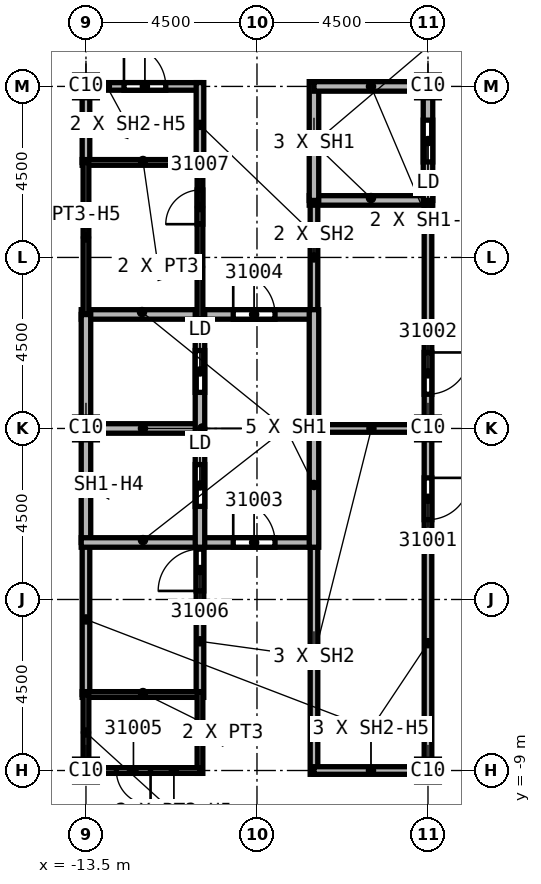
"""IFC4 building model, lengths in metres.
Left out: names, types, materials, properties, quantities, classifications, styles, units other than length and angle.
Written with IfcOpenShell. Run it as: python <this file> out.ifc"""

import sys

from ifc_helpers import new_model, si_unit, direction, frame, frame_2d, origin, origin_2d, place, context, subcontext, project, spatial, rectangle, extrude, element, fill, save


model = new_model("IFC4")
c1 = context("Model", 3, precision=1e-05, world=origin(), true_north=direction((0.0, 1.0)))
c2 = subcontext(c1, "Body", "Model", "MODEL_VIEW")
j1 = project(units=[si_unit("LENGTHUNIT", "METRE"), si_unit("PLANEANGLEUNIT", "RADIAN")], contexts=[c1])
p1 = place(None, origin())
s1 = spatial("IfcSite", under=j1, at=p1, CompositionType="ELEMENT")
p2 = place(p1, origin())
s2 = spatial("IfcBuilding", under=s1, at=p2, CompositionType="ELEMENT")
p3 = place(p2, frame((0.0, 0.0, 350.0)))
s3 = spatial("IfcBuildingStorey", under=s2, at=p3, CompositionType="ELEMENT", Elevation=350.0)
for number, where, z_axis, x_axis in (
    (1, (-4.5, 0.0, 0.0), (0.0, 0.0, 1.0), (1.0, 0.0, 0.0)),
    (2, (-4.5, 9.0, 0.0), (0.0, 0.0, 1.0), (1.0, 0.0, 0.0)),
    (3, (-4.5, -9.0, 0.0), (0.0, 0.0, 1.0), (1.0, 0.0, 0.0)),
    (4, (-13.5, 0.0, 0.0), (0.0, 0.0, 1.0), (1.0, 0.0, 0.0)),
    (5, (-13.5, 9.0, 0.0), (0.0, 0.0, 1.0), (1.0, 0.0, 0.0)),
    (6, (-13.5, -9.0, 0.0), (0.0, 0.0, 1.0), (1.0, 0.0, 0.0)),
):
    element("IfcColumn", number, at=place(p3, frame(where, z_axis=z_axis, x_axis=x_axis)), inside=s3, PredefinedType="COLUMN", context=c2, shape_type="SweptSolid", body=[
        extrude(rectangle(XDim=0.6, YDim=0.6, at=origin_2d()), origin(), (0.0, 0.0, 1.0), 5.6),
    ])
p4 = place(p3, frame((-13.5, -7.0, 0.0), z_axis=(0.0, 0.0, 1.0), x_axis=(0.0, 1.0, 0.0)))
e7 = element("IfcWall", 7, at=p4, inside=s3, PredefinedType="SOLIDWALL", context=c2, shape_type="SweptSolid", body=[
    extrude(rectangle(XDim=4.0, YDim=0.2, at=frame_2d((2.0, 0.0))), origin(), (0.0, 0.0, 1.0), 4.838),
])
p5 = place(p3, frame((-13.5, 7.0, 0.0), z_axis=(0.0, 0.0, 1.0), x_axis=(0.0, 1.0, 0.0)))
e8 = element("IfcWall", 8, at=p5, inside=s3, PredefinedType="SOLIDWALL", context=c2, shape_type="SweptSolid", body=[
    extrude(rectangle(XDim=2.1, YDim=0.2, at=frame_2d((1.05, 0.0))), origin(), (0.0, 0.0, 1.0), 4.838),
])
p6 = place(p3, frame((-13.5, 9.0, 0.0), z_axis=(0.0, 0.0, 1.0), x_axis=(1.0, 0.0, 0.0)))
e9 = element("IfcWall", 9, at=p6, inside=s3, PredefinedType="SOLIDWALL", context=c2, shape_type="SweptSolid", body=[
    extrude(rectangle(XDim=3.0, YDim=0.2, at=frame_2d((1.5, 0.0))), origin(), (0.0, 0.0, 1.0), 4.838),
])
p7 = place(p6, frame((1.0, 0.0, 0.0)))
e10 = element("IfcOpeningElement", 10, at=p7, cuts=e9, PredefinedType="OPENING", context=c2, shape_type="SweptSolid", body=[
    extrude(rectangle(XDim=1.1, YDim=2.1, at=frame_2d((0.55, 1.05))), frame((0.0, 0.1, 0.0), z_axis=(0.0, -1.0, 0.0), x_axis=(1.0, 0.0, 0.0)), (0.0, 0.0, 1.0), 0.2),
])
p8 = place(p3, frame((-10.5, -7.075, 0.0), z_axis=(0.0, 0.0, 1.0), x_axis=(0.0, 1.0, 0.0)))
e11 = element("IfcWall", 11, at=p8, inside=s3, PredefinedType="SOLIDWALL", context=c2, shape_type="SweptSolid", body=[
    extrude(rectangle(XDim=4.2, YDim=0.2, at=frame_2d((2.1, 0.0))), origin(), (0.0, 0.0, 1.0), 5.6),
])
p9 = place(p8, frame((2.8, 0.0, 0.0)))
e12 = element("IfcOpeningElement", 12, at=p9, cuts=e11, PredefinedType="OPENING", context=c2, shape_type="SweptSolid", body=[
    extrude(rectangle(XDim=1.1, YDim=2.1, at=frame_2d((0.55, 1.05))), frame((0.0, 0.1, 0.0), z_axis=(0.0, -1.0, 0.0), x_axis=(1.0, 0.0, 0.0)), (0.0, 0.0, 1.0), 0.2),
])
p10 = place(p3, frame((-10.5, 6.925, 0.0), z_axis=(0.0, 0.0, 1.0), x_axis=(0.0, 1.0, 0.0)))
e13 = element("IfcWall", 13, at=p10, inside=s3, PredefinedType="SOLIDWALL", context=c2, shape_type="SweptSolid", body=[
    extrude(rectangle(XDim=2.175, YDim=0.2, at=frame_2d((1.087, 0.0))), origin(), (0.0, 0.0, 1.0), 5.6),
])
p11 = place(p3, frame((-7.625, 0.0, 0.0), z_axis=(0.0, 0.0, 1.0), x_axis=(1.0, 0.0, 0.0)))
e14 = element("IfcWall", 14, at=p11, inside=s3, PredefinedType="SOLIDWALL", context=c2, shape_type="SweptSolid", body=[
    extrude(rectangle(XDim=3.225, YDim=0.2, at=frame_2d((1.613, 0.0))), origin(), (0.0, 0.0, 1.0), 5.6),
])
p12 = place(p3, frame((-7.5, -9.1, 0.0), z_axis=(0.0, 0.0, 1.0), x_axis=(0.0, 1.0, 0.0)))
e15 = element("IfcWall", 15, at=p12, inside=s3, PredefinedType="SOLIDWALL", context=c2, shape_type="SweptSolid", body=[
    extrude(rectangle(XDim=6.225, YDim=0.2, at=frame_2d((3.113, 0.0))), origin(), (0.0, 0.0, 1.0), 5.6),
])
p13 = place(p3, frame((-7.5, 2.875, 0.0), z_axis=(0.0, 0.0, 1.0), x_axis=(0.0, 1.0, 0.0)))
e16 = element("IfcWall", 16, at=p13, inside=s3, PredefinedType="SOLIDWALL", context=c2, shape_type="SweptSolid", body=[
    extrude(rectangle(XDim=3.125, YDim=0.2, at=frame_2d((1.562, 0.0))), origin(), (0.0, 0.0, 1.0), 5.6),
])
p14 = place(p3, frame((-4.5, -9.0, 0.0), z_axis=(0.0, 0.0, 1.0), x_axis=(-1.0, 0.0, 0.0)))
e17 = element("IfcWall", 17, at=p14, inside=s3, PredefinedType="SOLIDWALL", context=c2, shape_type="SweptSolid", body=[
    extrude(rectangle(XDim=3.0, YDim=0.2, at=frame_2d((1.5, 0.0))), origin(), (0.0, 0.0, 1.0), 4.838),
])
p15 = place(p3, frame((-4.5, 6.0, 0.0), z_axis=(0.0, 0.0, 1.0), x_axis=(0.0, -1.0, 0.0)))
e18 = element("IfcWall", 18, at=p15, inside=s3, PredefinedType="SOLIDWALL", context=c2, shape_type="SweptSolid", body=[
    extrude(rectangle(XDim=15.1, YDim=0.2, at=frame_2d((7.55, 0.0))), origin(), (0.0, 0.0, 1.0), 4.838),
])
p16 = place(p15, frame((7.3, 0.0, 0.0)))
e19 = element("IfcOpeningElement", 19, at=p16, cuts=e18, PredefinedType="OPENING", context=c2, shape_type="SweptSolid", body=[
    extrude(rectangle(XDim=1.1, YDim=2.1, at=frame_2d((0.55, 1.05))), frame((0.0, 0.1, 0.0), z_axis=(0.0, -1.0, 0.0), x_axis=(1.0, 0.0, 0.0)), (0.0, 0.0, 1.0), 0.2),
])
p17 = place(p15, frame((4.0, 0.0, 0.0)))
e20 = element("IfcOpeningElement", 20, at=p17, cuts=e18, PredefinedType="OPENING", context=c2, shape_type="SweptSolid", body=[
    extrude(rectangle(XDim=1.1, YDim=2.1, at=frame_2d((0.55, 1.05))), frame((0.0, 0.1, 0.0), z_axis=(0.0, -1.0, 0.0), x_axis=(1.0, 0.0, 0.0)), (0.0, 0.0, 1.0), 0.2),
])
p18 = place(p3, frame((-13.625, 0.0, 0.0), z_axis=(0.0, 0.0, 1.0), x_axis=(1.0, 0.0, 0.0)))
e21 = element("IfcWall", 21, at=p18, inside=s3, PredefinedType="SOLIDWALL", context=c2, shape_type="SweptSolid", body=[
    extrude(rectangle(XDim=3.125, YDim=0.25, at=frame_2d((1.562, 0.0))), origin(), (0.0, 0.0, 1.0), 5.6),
])
p19 = place(p3, frame((-13.625, 3.0, 0.0), z_axis=(0.0, 0.0, 1.0), x_axis=(1.0, 0.0, 0.0)))
e22 = element("IfcWall", 22, at=p19, inside=s3, PredefinedType="SOLIDWALL", context=c2, shape_type="SweptSolid", body=[
    extrude(rectangle(XDim=6.125, YDim=0.25, at=frame_2d((3.062, 0.0))), origin(), (0.0, 0.0, 1.0), 5.6),
])
p20 = place(p19, frame((4.0, 0.0, 0.0)))
e23 = element("IfcOpeningElement", 23, at=p20, cuts=e22, PredefinedType="OPENING", context=c2, shape_type="SweptSolid", body=[
    extrude(rectangle(XDim=1.1, YDim=2.1, at=frame_2d((0.55, 1.05))), frame((0.0, 0.125, 0.0), z_axis=(0.0, -1.0, 0.0), x_axis=(1.0, 0.0, 0.0)), (0.0, 0.0, 1.0), 0.25),
])
p21 = place(p3, frame((-13.5, -3.0, 0.0), z_axis=(0.0, 0.0, 1.0), x_axis=(0.0, 1.0, 0.0)))
e24 = element("IfcWall", 24, at=p21, inside=s3, PredefinedType="SOLIDWALL", context=c2, shape_type="SweptSolid", body=[
    extrude(rectangle(XDim=6.0, YDim=0.25, at=frame_2d((3.0, 0.0))), origin(), (0.0, 0.0, 1.0), 4.838),
])
p22 = place(p3, frame((-13.625, -3.0, 0.0), z_axis=(0.0, 0.0, 1.0), x_axis=(1.0, 0.0, 0.0)))
e25 = element("IfcWall", 25, at=p22, inside=s3, PredefinedType="SOLIDWALL", context=c2, shape_type="SweptSolid", body=[
    extrude(rectangle(XDim=6.125, YDim=0.25, at=frame_2d((3.062, 0.0))), origin(), (0.0, 0.0, 1.0), 5.6),
])
p23 = place(p22, frame((4.0, 0.0, 0.0)))
e26 = element("IfcOpeningElement", 26, at=p23, cuts=e25, PredefinedType="OPENING", context=c2, shape_type="SweptSolid", body=[
    extrude(rectangle(XDim=1.1, YDim=2.1, at=frame_2d((0.55, 1.05))), frame((0.0, 0.125, 0.0), z_axis=(0.0, -1.0, 0.0), x_axis=(1.0, 0.0, 0.0)), (0.0, 0.0, 1.0), 0.25),
])
p24 = place(p3, frame((-10.5, -3.125, 0.0), z_axis=(0.0, 0.0, 1.0), x_axis=(0.0, 1.0, 0.0)))
e27 = element("IfcWall", 27, at=p24, inside=s3, PredefinedType="SOLIDWALL", context=c2, shape_type="SweptSolid", body=[
    extrude(rectangle(XDim=6.25, YDim=0.25, at=frame_2d((3.125, 0.0))), origin(), (0.0, 0.0, 1.0), 5.6),
])
p25 = place(p24, frame((1.075, 0.0, 0.0)))
e28 = element("IfcOpeningElement", 28, at=p25, cuts=e27, PredefinedType="OPENING", context=c2, shape_type="SweptSolid", body=[
    extrude(rectangle(XDim=1.1, YDim=2.1, at=frame_2d((0.55, 1.05))), frame((0.0, 0.125, 0.0), z_axis=(0.0, -1.0, 0.0), x_axis=(1.0, 0.0, 0.0)), (0.0, 0.0, 1.0), 0.25),
])
p26 = place(p24, frame((4.075, 0.0, 0.0)))
e29 = element("IfcOpeningElement", 29, at=p26, cuts=e27, PredefinedType="OPENING", context=c2, shape_type="SweptSolid", body=[
    extrude(rectangle(XDim=1.1, YDim=2.1, at=frame_2d((0.55, 1.05))), frame((0.0, 0.125, 0.0), z_axis=(0.0, -1.0, 0.0), x_axis=(1.0, 0.0, 0.0)), (0.0, 0.0, 1.0), 0.25),
])
p27 = place(p3, frame((-7.625, 6.0, 0.0), z_axis=(0.0, 0.0, 1.0), x_axis=(1.0, 0.0, 0.0)))
e30 = element("IfcWall", 30, at=p27, inside=s3, PredefinedType="SOLIDWALL", context=c2, shape_type="SweptSolid", body=[
    extrude(rectangle(XDim=3.25, YDim=0.25, at=frame_2d((1.625, 0.0))), origin(), (0.0, 0.0, 1.0), 5.6),
])
p28 = place(p3, frame((-7.5, -3.125, 0.0), z_axis=(0.0, 0.0, 1.0), x_axis=(0.0, 1.0, 0.0)))
e31 = element("IfcWall", 31, at=p28, inside=s3, PredefinedType="SOLIDWALL", context=c2, shape_type="SweptSolid", body=[
    extrude(rectangle(XDim=6.25, YDim=0.25, at=frame_2d((3.125, 0.0))), origin(), (0.0, 0.0, 1.0), 5.6),
])
p29 = place(p3, frame((-7.5, 6.0, 0.0), z_axis=(0.0, 0.0, 1.0), x_axis=(0.0, 1.0, 0.0)))
e32 = element("IfcWall", 32, at=p29, inside=s3, PredefinedType="SOLIDWALL", context=c2, shape_type="SweptSolid", body=[
    extrude(rectangle(XDim=3.125, YDim=0.25, at=frame_2d((1.562, 0.0))), origin(), (0.0, 0.0, 1.0), 5.6),
])
p30 = place(p3, frame((-7.5, 9.0, 0.0), z_axis=(0.0, 0.0, 1.0), x_axis=(1.0, 0.0, 0.0)))
e33 = element("IfcWall", 33, at=p30, inside=s3, PredefinedType="SOLIDWALL", context=c2, shape_type="SweptSolid", body=[
    extrude(rectangle(XDim=3.0, YDim=0.25, at=frame_2d((1.5, 0.0))), origin(), (0.0, 0.0, 1.0), 4.838),
])
p31 = place(p3, frame((-4.5, 9.125, 0.0), z_axis=(0.0, 0.0, 1.0), x_axis=(0.0, -1.0, 0.0)))
e34 = element("IfcWall", 34, at=p31, inside=s3, PredefinedType="SOLIDWALL", context=c2, shape_type="SweptSolid", body=[
    extrude(rectangle(XDim=3.125, YDim=0.25, at=frame_2d((1.562, 0.0))), origin(), (0.0, 0.0, 1.0), 4.838),
])
p32 = place(p31, frame((1.012, 0.0, 0.0)))
e35 = element("IfcOpeningElement", 35, at=p32, cuts=e34, PredefinedType="OPENING", context=c2, shape_type="SweptSolid", body=[
    extrude(rectangle(XDim=1.1, YDim=2.1, at=frame_2d((0.55, 1.05))), frame((0.0, 0.125, 0.0), z_axis=(0.0, -1.0, 0.0), x_axis=(1.0, 0.0, 0.0)), (0.0, 0.0, 1.0), 0.25),
])
for number, where, z_axis, x_axis in (
    (36, (-13.6, -7.0, 0.0), (0.0, 0.0, 1.0), (1.0, 0.0, 0.0)),
    (37, (-13.6, 7.0, 0.0), (0.0, 0.0, 1.0), (1.0, 0.0, 0.0)),
):
    element("IfcWall", number, at=place(p3, frame(where, z_axis=z_axis, x_axis=x_axis)), inside=s3, PredefinedType="PARTITIONING", context=c2, shape_type="SweptSolid", body=[
        extrude(rectangle(XDim=3.1, YDim=0.15, at=frame_2d((1.55, 0.0))), origin(), (0.0, 0.0, 1.0), 5.6),
    ])
p33 = place(p3, frame((-13.5, -9.075, 0.0), z_axis=(0.0, 0.0, 1.0), x_axis=(0.0, 1.0, 0.0)))
e38 = element("IfcWall", 38, at=p33, inside=s3, PredefinedType="PARTITIONING", context=c2, shape_type="SweptSolid", body=[
    extrude(rectangle(XDim=2.075, YDim=0.15, at=frame_2d((1.038, 0.0))), origin(), (0.0, 0.0, 1.0), 4.838),
])
p34 = place(p3, frame((-13.5, 3.0, 0.0), z_axis=(0.0, 0.0, 1.0), x_axis=(0.0, 1.0, 0.0)))
e39 = element("IfcWall", 39, at=p34, inside=s3, PredefinedType="PARTITIONING", context=c2, shape_type="SweptSolid", body=[
    extrude(rectangle(XDim=4.0, YDim=0.15, at=frame_2d((2.0, 0.0))), origin(), (0.0, 0.0, 1.0), 4.838),
])
p35 = place(p3, frame((-10.5, -9.075, 0.0), z_axis=(0.0, 0.0, 1.0), x_axis=(0.0, 1.0, 0.0)))
e40 = element("IfcWall", 40, at=p35, inside=s3, PredefinedType="PARTITIONING", context=c2, shape_type="SweptSolid", body=[
    extrude(rectangle(XDim=2.15, YDim=0.15, at=frame_2d((1.075, 0.0))), origin(), (0.0, 0.0, 1.0), 5.6),
])
p36 = place(p3, frame((-10.5, -9.0, 0.0), z_axis=(0.0, 0.0, 1.0), x_axis=(-1.0, 0.0, 0.0)))
e41 = element("IfcWall", 41, at=p36, inside=s3, PredefinedType="PARTITIONING", context=c2, shape_type="SweptSolid", body=[
    extrude(rectangle(XDim=3.0, YDim=0.15, at=frame_2d((1.5, 0.0))), origin(), (0.0, 0.0, 1.0), 4.838),
])
p37 = place(p36, frame((1.3, 0.0, 0.0)))
e42 = element("IfcOpeningElement", 42, at=p37, cuts=e41, PredefinedType="OPENING", context=c2, shape_type="SweptSolid", body=[
    extrude(rectangle(XDim=0.9, YDim=2.1, at=frame_2d((0.45, 1.05))), frame((0.0, 0.075, 0.0), z_axis=(0.0, -1.0, 0.0), x_axis=(1.0, 0.0, 0.0)), (0.0, 0.0, 1.0), 0.15),
])
p38 = place(p3, frame((-10.5, 2.875, 0.0), z_axis=(0.0, 0.0, 1.0), x_axis=(0.0, 1.0, 0.0)))
e43 = element("IfcWall", 43, at=p38, inside=s3, PredefinedType="PARTITIONING", context=c2, shape_type="SweptSolid", body=[
    extrude(rectangle(XDim=4.2, YDim=0.15, at=frame_2d((2.1, 0.0))), origin(), (0.0, 0.0, 1.0), 5.6),
])
p39 = place(p38, frame((2.5, 0.0, 0.0)))
e44 = element("IfcOpeningElement", 44, at=p39, cuts=e43, PredefinedType="OPENING", context=c2, shape_type="SweptSolid", body=[
    extrude(rectangle(XDim=0.9, YDim=2.1, at=frame_2d((0.45, 1.05))), frame((0.0, 0.075, 0.0), z_axis=(0.0, -1.0, 0.0), x_axis=(1.0, 0.0, 0.0)), (0.0, 0.0, 1.0), 0.15),
])
p40 = place(p16, origin())
e45 = element("IfcDoor", 45, at=p40, inside=s3, OperationType="SINGLE_SWING_RIGHT", PredefinedType="DOOR", context=c2, shape_type="SweptSolid", body=[
    extrude(rectangle(XDim=1.1, YDim=2.1, at=frame_2d((0.55, 1.05))), frame((0.0, 0.025, 0.0), z_axis=(0.0, -1.0, 0.0), x_axis=(1.0, 0.0, 0.0)), (0.0, 0.0, 1.0), 0.05),
])
fill(e19, e45)
p41 = place(p17, origin())
e46 = element("IfcDoor", 46, at=p41, inside=s3, OperationType="SINGLE_SWING_LEFT", PredefinedType="DOOR", context=c2, shape_type="SweptSolid", body=[
    extrude(rectangle(XDim=1.1, YDim=2.1, at=frame_2d((0.55, 1.05))), frame((0.0, 0.025, 0.0), z_axis=(0.0, -1.0, 0.0), x_axis=(1.0, 0.0, 0.0)), (0.0, 0.0, 1.0), 0.05),
])
fill(e20, e46)
p42 = place(p23, origin())
e47 = element("IfcDoor", 47, at=p42, inside=s3, OperationType="SINGLE_SWING_RIGHT", PredefinedType="DOOR", context=c2, shape_type="SweptSolid", body=[
    extrude(rectangle(XDim=1.1, YDim=2.1, at=frame_2d((0.55, 1.05))), frame((0.0, 0.025, 0.0), z_axis=(0.0, -1.0, 0.0), x_axis=(1.0, 0.0, 0.0)), (0.0, 0.0, 1.0), 0.05),
])
fill(e26, e47)
p43 = place(p20, origin())
e48 = element("IfcDoor", 48, at=p43, inside=s3, OperationType="SINGLE_SWING_LEFT", PredefinedType="DOOR", context=c2, shape_type="SweptSolid", body=[
    extrude(rectangle(XDim=1.1, YDim=2.1, at=frame_2d((0.55, 1.05))), frame((0.0, 0.025, 0.0), z_axis=(0.0, -1.0, 0.0), x_axis=(1.0, 0.0, 0.0)), (0.0, 0.0, 1.0), 0.05),
])
fill(e23, e48)
p44 = place(p37, origin())
e49 = element("IfcDoor", 49, at=p44, inside=s3, OperationType="SINGLE_SWING_RIGHT", PredefinedType="DOOR", context=c2, shape_type="SweptSolid", body=[
    extrude(rectangle(XDim=0.9, YDim=2.1, at=frame_2d((0.45, 1.05))), frame((0.0, 0.025, 0.0), z_axis=(0.0, -1.0, 0.0), x_axis=(1.0, 0.0, 0.0)), (0.0, 0.0, 1.0), 0.05),
])
fill(e42, e49)
p45 = place(p9, origin())
e50 = element("IfcDoor", 50, at=p45, inside=s3, OperationType="SINGLE_SWING_LEFT", PredefinedType="DOOR", context=c2, shape_type="SweptSolid", body=[
    extrude(rectangle(XDim=1.1, YDim=2.1, at=frame_2d((0.55, 1.05))), frame((0.0, 0.025, 0.0), z_axis=(0.0, -1.0, 0.0), x_axis=(1.0, 0.0, 0.0)), (0.0, 0.0, 1.0), 0.05),
])
fill(e12, e50)
p46 = place(p39, origin())
e51 = element("IfcDoor", 51, at=p46, inside=s3, OperationType="SINGLE_SWING_RIGHT", PredefinedType="DOOR", context=c2, shape_type="SweptSolid", body=[
    extrude(rectangle(XDim=0.9, YDim=2.1, at=frame_2d((0.45, 1.05))), frame((0.0, 0.025, 0.0), z_axis=(0.0, -1.0, 0.0), x_axis=(1.0, 0.0, 0.0)), (0.0, 0.0, 1.0), 0.05),
])
fill(e44, e51)
p47 = place(p7, origin())
e52 = element("IfcDoor", 52, at=p47, inside=s3, OperationType="SINGLE_SWING_LEFT", PredefinedType="DOOR", context=c2, shape_type="SweptSolid", body=[
    extrude(rectangle(XDim=1.1, YDim=2.1, at=frame_2d((0.55, 1.05))), frame((0.0, 0.025, 0.0), z_axis=(0.0, -1.0, 0.0), x_axis=(1.0, 0.0, 0.0)), (0.0, 0.0, 1.0), 0.05),
])
fill(e10, e52)
p48 = place(p32, origin())
e53 = element("IfcDoor", 53, at=p48, inside=s3, OperationType="SLIDING_TO_LEFT", PredefinedType="DOOR", context=c2, shape_type="SweptSolid", body=[
    extrude(rectangle(XDim=1.1, YDim=2.1, at=frame_2d((0.55, 1.05))), frame((0.0, 0.025, 0.0), z_axis=(0.0, -1.0, 0.0), x_axis=(1.0, 0.0, 0.0)), (0.0, 0.0, 1.0), 0.05),
])
fill(e35, e53)
p49 = place(p25, origin())
e54 = element("IfcDoor", 54, at=p49, inside=s3, OperationType="SLIDING_TO_LEFT", PredefinedType="DOOR", context=c2, shape_type="SweptSolid", body=[
    extrude(rectangle(XDim=1.1, YDim=2.1, at=frame_2d((0.55, 1.05))), frame((0.0, 0.025, 0.0), z_axis=(0.0, -1.0, 0.0), x_axis=(1.0, 0.0, 0.0)), (0.0, 0.0, 1.0), 0.05),
])
fill(e28, e54)
p50 = place(p26, origin())
e55 = element("IfcDoor", 55, at=p50, inside=s3, OperationType="SLIDING_TO_LEFT", PredefinedType="DOOR", context=c2, shape_type="SweptSolid", body=[
    extrude(rectangle(XDim=1.1, YDim=2.1, at=frame_2d((0.55, 1.05))), frame((0.0, 0.025, 0.0), z_axis=(0.0, -1.0, 0.0), x_axis=(1.0, 0.0, 0.0)), (0.0, 0.0, 1.0), 0.05),
])
fill(e29, e55)
save(model, sys.argv[1])
